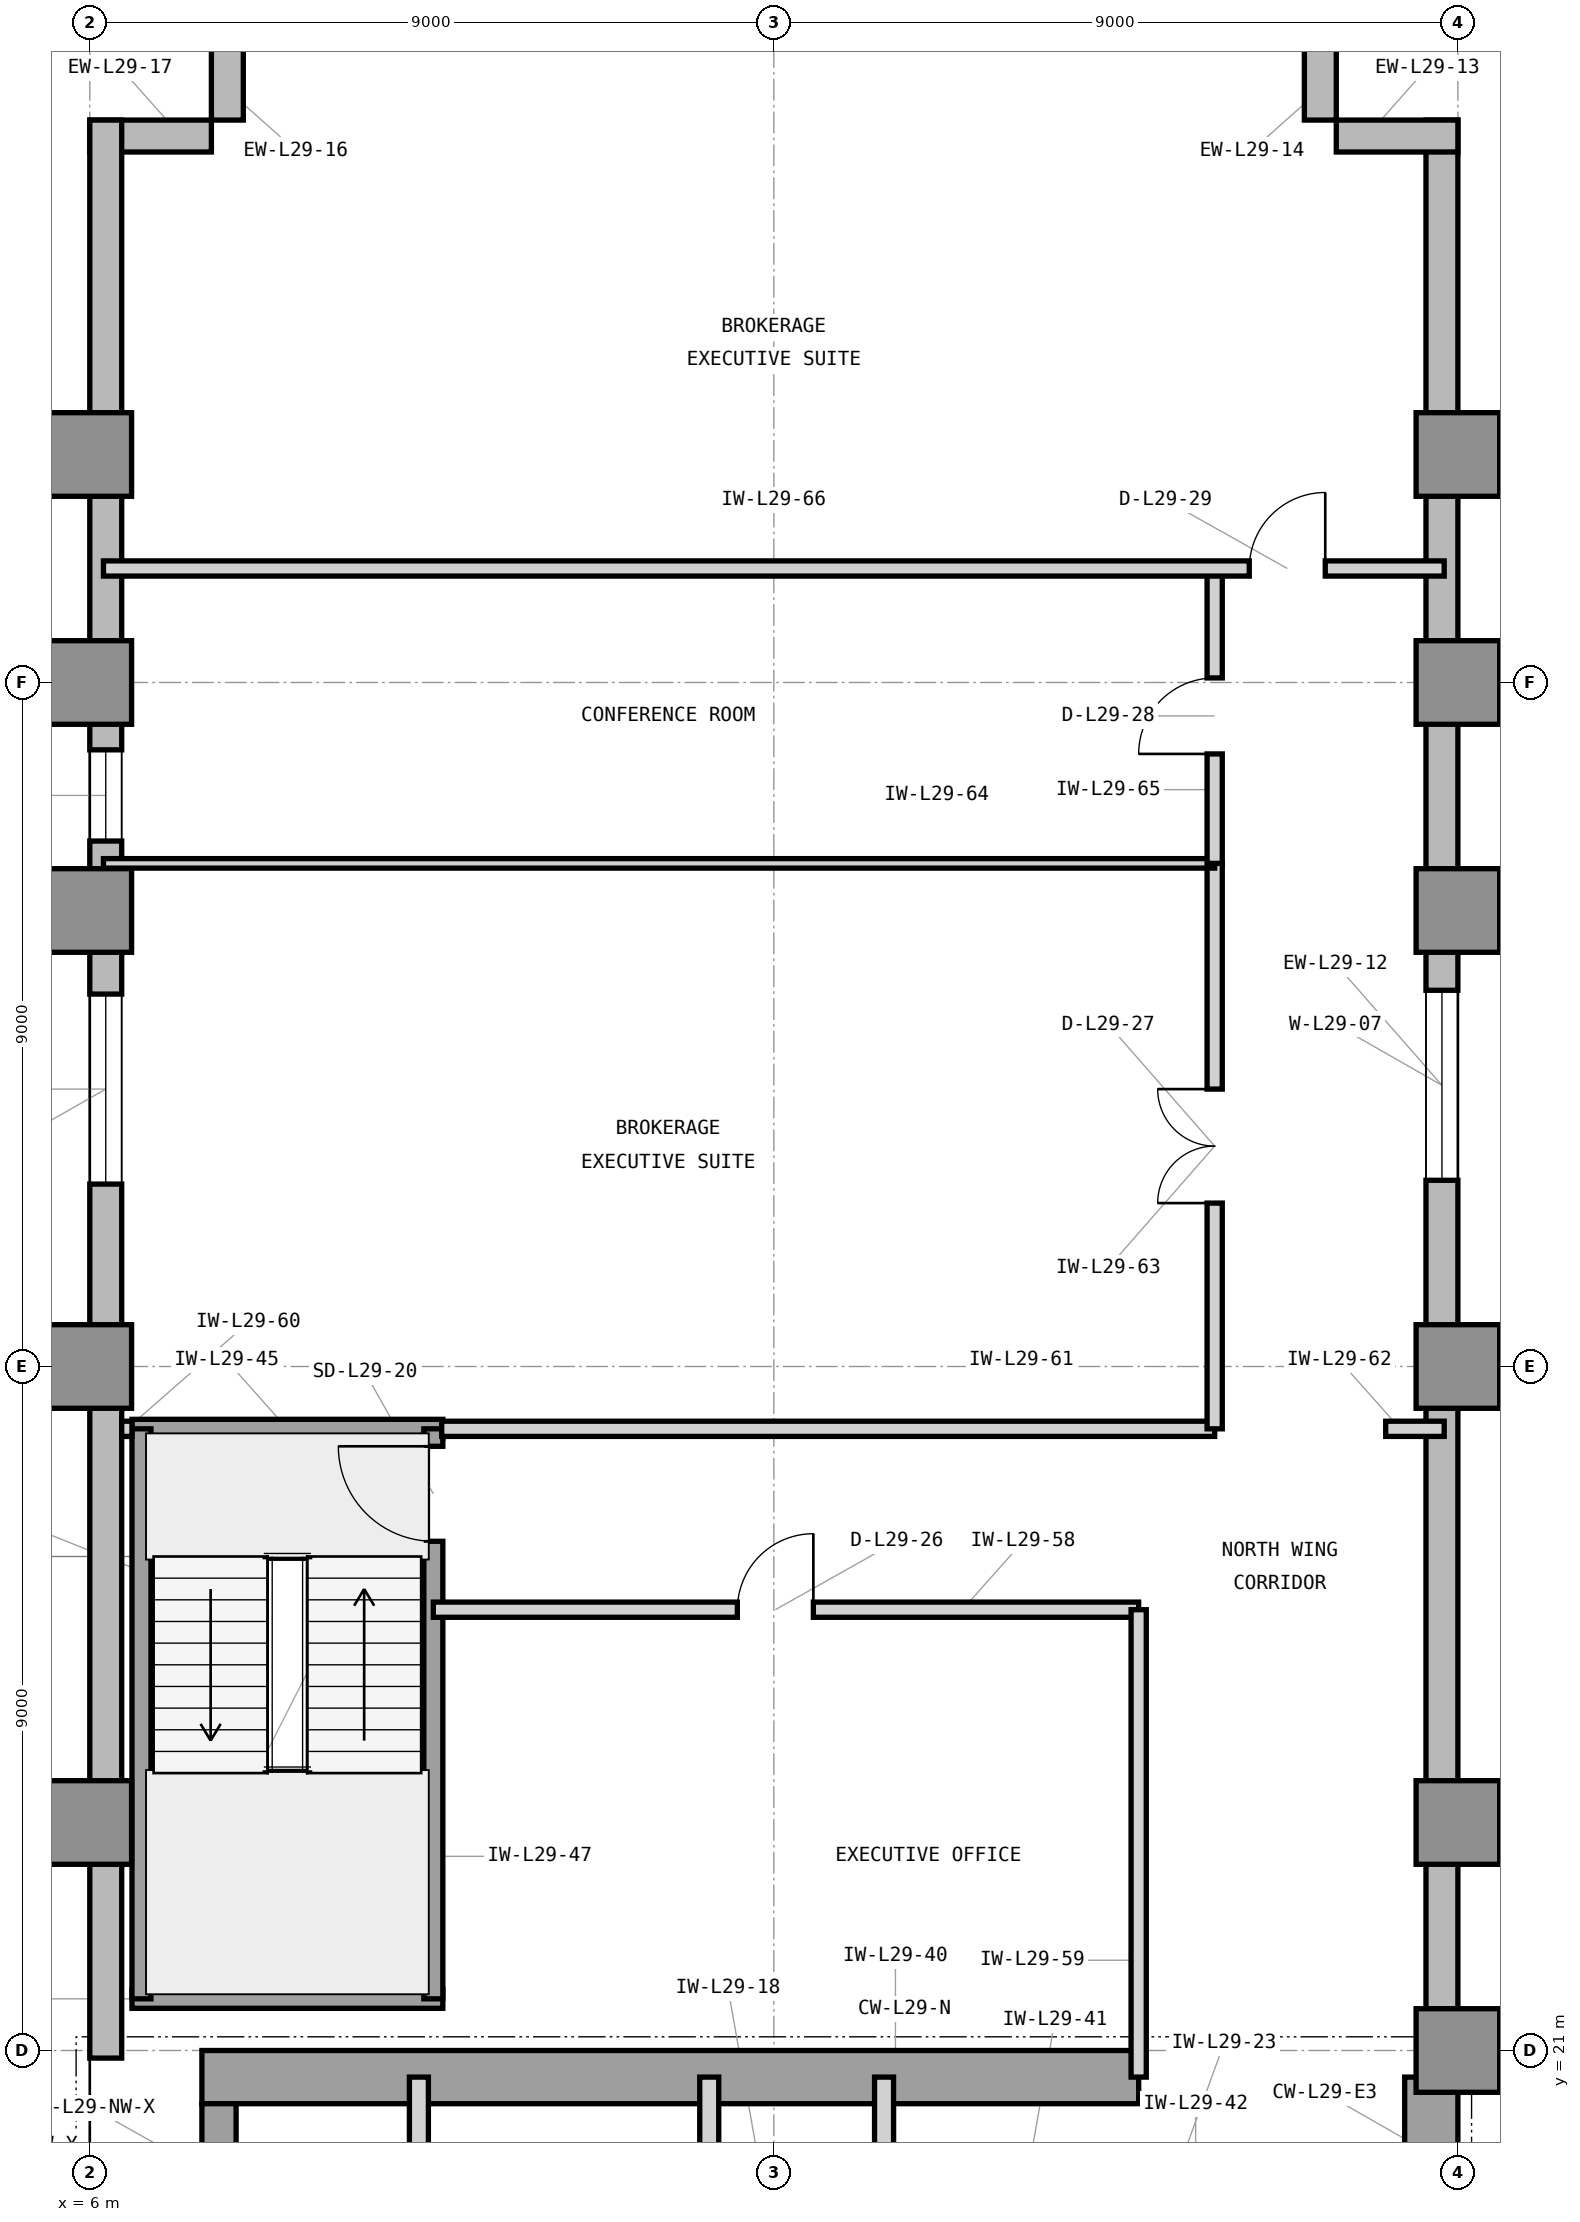
"""IFC4 building model, lengths in metres.
Left out: names, types, materials, properties, quantities, classifications, styles, units other than length and angle.
Written with IfcOpenShell. Run it as: python <this file> out.ifc"""

import sys

from ifc_helpers import new_model, si_unit, direction, frame, frame_2d, origin, origin_2d, place, context, subcontext, project, spatial, rectangle, extrude, element, fill, save


model = new_model("IFC4")
c1 = context("Model", 3, precision=1e-05, world=origin(), true_north=direction((0.0, 1.0)))
c2 = subcontext(c1, "Body", "Model", "MODEL_VIEW")
j1 = project(units=[si_unit("LENGTHUNIT", "METRE"), si_unit("PLANEANGLEUNIT", "RADIAN")], contexts=[c1])
p1 = place(None, origin())
s1 = spatial("IfcSite", under=j1, at=p1, CompositionType="ELEMENT")
p2 = place(p1, origin())
s2 = spatial("IfcBuilding", under=s1, at=p2, CompositionType="ELEMENT")
p3 = place(p2, frame((0.0, 0.0, 124.5)))
s3 = spatial("IfcBuildingStorey", under=s2, at=p3, CompositionType="ELEMENT", Elevation=124.5)
p4 = place(p3, frame((7.475, 20.65, 0.0), z_axis=(0.0, 0.0, 1.0), x_axis=(1.0, 0.0, 0.0)))
e1 = element("IfcWall", 1, at=p4, inside=s3, PredefinedType="SHEAR", context=c2, shape_type="SweptSolid", body=[
    extrude(rectangle(XDim=12.325, YDim=0.7, at=frame_2d((6.163, 0.0))), origin(), (0.0, 0.0, 1.0), 3.9),
])
p5 = place(p3, frame((23.65, 16.6, 0.0), z_axis=(0.0, 0.0, 1.0), x_axis=(0.0, 1.0, 0.0)))
e2 = element("IfcWall", 2, at=p5, inside=s3, PredefinedType="SHEAR", context=c2, shape_type="SweptSolid", body=[
    extrude(rectangle(XDim=4.05, YDim=0.7, at=frame_2d((2.025, 0.0))), origin(), (0.0, 0.0, 1.0), 3.9),
])
p6 = place(p3, frame((7.7, 19.575, 0.0), z_axis=(0.0, 0.0, 1.0), x_axis=(0.0, 1.0, 0.0)))
e3 = element("IfcWall", 3, at=p6, inside=s3, PredefinedType="SHEAR", context=c2, shape_type="SweptSolid", body=[
    extrude(rectangle(XDim=0.725, YDim=0.45, at=frame_2d((0.363, 0.0))), origin(), (0.0, 0.0, 1.0), 3.9),
])
for number, where, z_axis, x_axis in (
    (4, (24.0, 21.0, 0.0), (0.0, 0.0, 1.0), (1.0, 0.0, 0.0)),
    (5, (6.0, 24.0, 0.0), (0.0, 0.0, 1.0), (1.0, 0.0, 0.0)),
    (6, (24.0, 24.0, 0.0), (0.0, 0.0, 1.0), (1.0, 0.0, 0.0)),
    (7, (6.0, 30.0, 0.0), (0.0, 0.0, 1.0), (1.0, 0.0, 0.0)),
    (8, (24.0, 30.0, 0.0), (0.0, 0.0, 1.0), (1.0, 0.0, 0.0)),
    (9, (6.0, 36.0, 0.0), (0.0, 0.0, 1.0), (1.0, 0.0, 0.0)),
    (10, (24.0, 36.0, 0.0), (0.0, 0.0, 1.0), (1.0, 0.0, 0.0)),
    (11, (6.0, 39.0, 0.0), (0.0, 0.0, 1.0), (1.0, 0.0, 0.0)),
    (12, (24.0, 39.0, 0.0), (0.0, 0.0, 1.0), (1.0, 0.0, 0.0)),
    (13, (6.0, 42.0, 0.0), (0.0, 0.0, 1.0), (1.0, 0.0, 0.0)),
    (14, (24.0, 42.0, 0.0), (0.0, 0.0, 1.0), (1.0, 0.0, 0.0)),
):
    element("IfcColumn", number, at=place(p3, frame(where, z_axis=z_axis, x_axis=x_axis)), inside=s3, PredefinedType="COLUMN", context=c2, shape_type="SweptSolid", body=[
        extrude(rectangle(XDim=1.1, YDim=1.1, at=origin_2d()), origin(), (0.0, 0.0, 1.0), 3.9),
    ])
p7 = place(p3, frame((61.4, 20.79, 0.0), z_axis=(0.0, 0.0, 1.0), x_axis=(-1.0, 0.0, 0.0)))
e15 = element("IfcWall", 15, at=p7, inside=s3, PredefinedType="STANDARD", context=c2, shape_type="SweptSolid", body=[
    extrude(rectangle(XDim=37.4, YDim=0.42, at=frame_2d((18.7, 0.0))), origin(), (0.0, 0.0, 1.0), 3.7),
])
p8 = place(p7, frame((15.113, 0.0, 0.85)))
e16 = element("IfcOpeningElement", 16, at=p8, cuts=e15, PredefinedType="OPENING", context=c2, shape_type="SweptSolid", body=[
    extrude(rectangle(XDim=2.5, YDim=2.25, at=frame_2d((1.25, 1.125))), frame((0.0, 0.22, 0.0), z_axis=(0.0, -1.0, 0.0), x_axis=(1.0, 0.0, 0.0)), (0.0, 0.0, 1.0), 0.44),
])
p9 = place(p7, frame((24.462, 0.0, 0.85)))
e17 = element("IfcOpeningElement", 17, at=p9, cuts=e15, PredefinedType="OPENING", context=c2, shape_type="SweptSolid", body=[
    extrude(rectangle(XDim=2.5, YDim=2.25, at=frame_2d((1.25, 1.125))), frame((0.0, 0.22, 0.0), z_axis=(0.0, -1.0, 0.0), x_axis=(1.0, 0.0, 0.0)), (0.0, 0.0, 1.0), 0.44),
])
p10 = place(p3, frame((23.79, 21.0, 0.0), z_axis=(0.0, 0.0, 1.0), x_axis=(0.0, 1.0, 0.0)))
e18 = element("IfcWall", 18, at=p10, inside=s3, PredefinedType="STANDARD", context=c2, shape_type="SweptSolid", body=[
    extrude(rectangle(XDim=25.4, YDim=0.42, at=frame_2d((12.7, 0.0))), origin(), (0.0, 0.0, 1.0), 3.7),
])
p11 = place(p10, frame((11.45, 0.0, 0.85)))
e19 = element("IfcOpeningElement", 19, at=p11, cuts=e18, PredefinedType="OPENING", context=c2, shape_type="SweptSolid", body=[
    extrude(rectangle(XDim=2.5, YDim=2.25, at=frame_2d((1.25, 1.125))), frame((0.0, 0.22, 0.0), z_axis=(0.0, -1.0, 0.0), x_axis=(1.0, 0.0, 0.0)), (0.0, 0.0, 1.0), 0.44),
])
for number, where, z_axis, x_axis in (
    (20, (24.0, 46.19, 0.0), (0.0, 0.0, 1.0), (-1.0, 0.0, 0.0)),
    (21, (22.19, 46.4, 0.0), (0.0, 0.0, 1.0), (0.0, 1.0, 0.0)),
    (22, (7.81, 48.0, 0.0), (0.0, 0.0, 1.0), (0.0, -1.0, 0.0)),
    (23, (7.6, 46.19, 0.0), (0.0, 0.0, 1.0), (-1.0, 0.0, 0.0)),
):
    element("IfcWall", number, at=place(p3, frame(where, z_axis=z_axis, x_axis=x_axis)), inside=s3, PredefinedType="STANDARD", context=c2, shape_type="SweptSolid", body=[
        extrude(rectangle(XDim=1.6, YDim=0.42, at=frame_2d((0.8, 0.0))), origin(), (0.0, 0.0, 1.0), 3.7),
    ])
p12 = place(p3, frame((6.21, 46.4, 0.0), z_axis=(0.0, 0.0, 1.0), x_axis=(0.0, -1.0, 0.0)))
e24 = element("IfcWall", 24, at=p12, inside=s3, PredefinedType="STANDARD", context=c2, shape_type="SweptSolid", body=[
    extrude(rectangle(XDim=25.5, YDim=0.42, at=frame_2d((12.75, 0.0))), origin(), (0.0, 0.0, 1.0), 3.7),
])
p13 = place(p12, frame((11.5, 0.0, 0.85)))
e25 = element("IfcOpeningElement", 25, at=p13, cuts=e24, PredefinedType="OPENING", context=c2, shape_type="SweptSolid", body=[
    extrude(rectangle(XDim=2.5, YDim=2.25, at=frame_2d((1.25, 1.125))), frame((0.0, 0.22, 0.0), z_axis=(0.0, -1.0, 0.0), x_axis=(1.0, 0.0, 0.0)), (0.0, 0.0, 1.0), 0.44),
])
p14 = place(p12, frame((8.286, 0.0, 0.85)))
e26 = element("IfcOpeningElement", 26, at=p14, cuts=e24, PredefinedType="OPENING", context=c2, shape_type="SweptSolid", body=[
    extrude(rectangle(XDim=1.2, YDim=2.25, at=frame_2d((0.6, 1.125))), frame((0.0, 0.22, 0.0), z_axis=(0.0, -1.0, 0.0), x_axis=(1.0, 0.0, 0.0)), (0.0, 0.0, 1.0), 0.44),
])
p15 = place(p3, frame((10.33, 19.45, 0.0), z_axis=(0.0, 0.0, 1.0), x_axis=(0.0, 1.0, 0.0)))
e27 = element("IfcWall", 27, at=p15, inside=s3, PredefinedType="PARTITIONING", context=c2, shape_type="SweptSolid", body=[
    extrude(rectangle(XDim=1.2, YDim=0.25, at=frame_2d((0.6, 0.0))), origin(), (0.0, 0.0, 1.0), 2.994),
])
for number, where, z_axis, x_axis in (
    (28, (14.15, 16.7, 0.0), (0.0, 0.0, 1.0), (0.0, 1.0, 0.0)),
    (29, (16.45, 16.7, 0.0), (0.0, 0.0, 1.0), (0.0, 1.0, 0.0)),
):
    element("IfcWall", number, at=place(p3, frame(where, z_axis=z_axis, x_axis=x_axis)), inside=s3, PredefinedType="PARTITIONING", context=c2, shape_type="SweptSolid", body=[
        extrude(rectangle(XDim=3.95, YDim=0.25, at=frame_2d((1.975, 0.0))), origin(), (0.0, 0.0, 1.0), 3.69),
    ])
for number, where, z_axis, x_axis in (
    (30, (6.555, 21.68, 0.0), (0.0, 0.0, 1.0), (1.0, 0.0, 0.0)),
    (31, (6.555, 29.18, 0.0), (0.0, 0.0, 1.0), (1.0, 0.0, 0.0)),
):
    element("IfcWall", number, at=place(p3, frame(where, z_axis=z_axis, x_axis=x_axis)), inside=s3, PredefinedType="SHEAR", context=c2, shape_type="SweptSolid", body=[
        extrude(rectangle(XDim=4.09, YDim=0.25, at=frame_2d((2.045, 0.0))), origin(), (0.0, 0.0, 1.0), 3.9),
    ])
p16 = place(p3, frame((6.68, 21.68, 0.0), z_axis=(0.0, 0.0, 1.0), x_axis=(0.0, 1.0, 0.0)))
e32 = element("IfcWall", 32, at=p16, inside=s3, PredefinedType="SHEAR", context=c2, shape_type="SweptSolid", body=[
    extrude(rectangle(XDim=7.5, YDim=0.25, at=frame_2d((3.75, 0.0))), origin(), (0.0, 0.0, 1.0), 3.9),
])
p17 = place(p3, frame((10.52, 21.68, 0.0), z_axis=(0.0, 0.0, 1.0), x_axis=(0.0, 1.0, 0.0)))
e33 = element("IfcWall", 33, at=p17, inside=s3, PredefinedType="SHEAR", context=c2, shape_type="SweptSolid", body=[
    extrude(rectangle(XDim=7.5, YDim=0.25, at=frame_2d((3.75, 0.0))), origin(), (0.0, 0.0, 1.0), 3.9),
])
p18 = place(p17, frame((6.02, 0.0, 0.0)))
e34 = element("IfcOpeningElement", 34, at=p18, cuts=e33, PredefinedType="OPENING", context=c2, shape_type="SweptSolid", body=[
    extrude(rectangle(XDim=1.25, YDim=2.2, at=frame_2d((0.625, 1.1))), frame((0.0, 0.135, 0.0), z_axis=(0.0, -1.0, 0.0), x_axis=(1.0, 0.0, 0.0)), (0.0, 0.0, 1.0), 0.27),
])
p19 = place(p3, frame((10.52, 26.8, 0.0), z_axis=(0.0, 0.0, 1.0), x_axis=(1.0, 0.0, 0.0)))
e35 = element("IfcWall", 35, at=p19, inside=s3, PredefinedType="PARTITIONING", context=c2, shape_type="SweptSolid", body=[
    extrude(rectangle(XDim=9.28, YDim=0.2, at=frame_2d((4.64, 0.0))), origin(), (0.0, 0.0, 1.0), 3.69),
])
p20 = place(p19, frame((4.0, 0.0, 0.0)))
e36 = element("IfcOpeningElement", 36, at=p20, cuts=e35, PredefinedType="OPENING", context=c2, shape_type="SweptSolid", body=[
    extrude(rectangle(XDim=1.0, YDim=2.15, at=frame_2d((0.5, 1.075))), frame((0.0, 0.11, 0.0), z_axis=(0.0, -1.0, 0.0), x_axis=(1.0, 0.0, 0.0)), (0.0, 0.0, 1.0), 0.22),
])
p21 = place(p3, frame((19.8, 20.65, 0.0), z_axis=(0.0, 0.0, 1.0), x_axis=(0.0, 1.0, 0.0)))
e37 = element("IfcWall", 37, at=p21, inside=s3, PredefinedType="PARTITIONING", context=c2, shape_type="SweptSolid", body=[
    extrude(rectangle(XDim=6.15, YDim=0.2, at=frame_2d((3.075, 0.0))), origin(), (0.0, 0.0, 1.0), 3.69),
])
p22 = place(p3, frame((6.42, 29.18, 0.0), z_axis=(0.0, 0.0, 1.0), x_axis=(1.0, 0.0, 0.0)))
e38 = element("IfcWall", 38, at=p22, inside=s3, PredefinedType="PARTITIONING", context=c2, shape_type="SweptSolid", body=[
    extrude(rectangle(XDim=0.135, YDim=0.2, at=frame_2d((0.067, 0.0))), origin(), (0.0, 0.0, 1.0), 3.69),
])
p23 = place(p3, frame((10.63, 29.18, 0.0), z_axis=(0.0, 0.0, 1.0), x_axis=(1.0, 0.0, 0.0)))
e39 = element("IfcWall", 39, at=p23, inside=s3, PredefinedType="PARTITIONING", context=c2, shape_type="SweptSolid", body=[
    extrude(rectangle(XDim=10.17, YDim=0.2, at=frame_2d((5.085, 0.0))), origin(), (0.0, 0.0, 1.0), 3.69),
])
p24 = place(p3, frame((23.05, 29.18, 0.0), z_axis=(0.0, 0.0, 1.0), x_axis=(1.0, 0.0, 0.0)))
e40 = element("IfcWall", 40, at=p24, inside=s3, PredefinedType="PARTITIONING", context=c2, shape_type="SweptSolid", body=[
    extrude(rectangle(XDim=0.77, YDim=0.2, at=frame_2d((0.385, 0.0))), origin(), (0.0, 0.0, 1.0), 3.69),
])
p25 = place(p3, frame((20.8, 29.18, 0.0), z_axis=(0.0, 0.0, 1.0), x_axis=(0.0, 1.0, 0.0)))
e41 = element("IfcWall", 41, at=p25, inside=s3, PredefinedType="PARTITIONING", context=c2, shape_type="SweptSolid", body=[
    extrude(rectangle(XDim=7.44, YDim=0.2, at=frame_2d((3.72, 0.0))), origin(), (0.0, 0.0, 1.0), 3.69),
])
p26 = place(p25, frame((2.97, 0.0, 0.0)))
e42 = element("IfcOpeningElement", 42, at=p26, cuts=e41, PredefinedType="OPENING", context=c2, shape_type="SweptSolid", body=[
    extrude(rectangle(XDim=1.5, YDim=2.3, at=frame_2d((0.75, 1.15))), frame((0.0, 0.11, 0.0), z_axis=(0.0, -1.0, 0.0), x_axis=(1.0, 0.0, 0.0)), (0.0, 0.0, 1.0), 0.22),
])
p27 = place(p3, frame((6.18, 36.62, 0.0), z_axis=(0.0, 0.0, 1.0), x_axis=(1.0, 0.0, 0.0)))
e43 = element("IfcWall", 43, at=p27, inside=s3, PredefinedType="PARTITIONING", context=c2, shape_type="SweptSolid", body=[
    extrude(rectangle(XDim=14.62, YDim=0.125, at=frame_2d((7.31, 0.0))), origin(), (0.0, 0.0, 1.0), 3.69),
])
p28 = place(p3, frame((20.8, 36.62, 0.0), z_axis=(0.0, 0.0, 1.0), x_axis=(0.0, 1.0, 0.0)))
e44 = element("IfcWall", 44, at=p28, inside=s3, PredefinedType="PARTITIONING", context=c2, shape_type="SweptSolid", body=[
    extrude(rectangle(XDim=3.88, YDim=0.2, at=frame_2d((1.94, 0.0))), origin(), (0.0, 0.0, 1.0), 3.69),
])
p29 = place(p28, frame((1.44, 0.0, 0.0)))
e45 = element("IfcOpeningElement", 45, at=p29, cuts=e44, PredefinedType="OPENING", context=c2, shape_type="SweptSolid", body=[
    extrude(rectangle(XDim=1.0, YDim=2.15, at=frame_2d((0.5, 1.075))), frame((0.0, 0.11, 0.0), z_axis=(0.0, -1.0, 0.0), x_axis=(1.0, 0.0, 0.0)), (0.0, 0.0, 1.0), 0.22),
])
p30 = place(p3, frame((6.18, 40.5, 0.0), z_axis=(0.0, 0.0, 1.0), x_axis=(1.0, 0.0, 0.0)))
e46 = element("IfcWall", 46, at=p30, inside=s3, PredefinedType="PARTITIONING", context=c2, shape_type="SweptSolid", body=[
    extrude(rectangle(XDim=17.64, YDim=0.2, at=frame_2d((8.82, 0.0))), origin(), (0.0, 0.0, 1.0), 3.69),
])
p31 = place(p30, frame((15.075, 0.0, 0.0)))
e47 = element("IfcOpeningElement", 47, at=p31, cuts=e46, PredefinedType="OPENING", context=c2, shape_type="SweptSolid", body=[
    extrude(rectangle(XDim=1.0, YDim=2.15, at=frame_2d((0.5, 1.075))), frame((0.0, 0.11, 0.0), z_axis=(0.0, -1.0, 0.0), x_axis=(1.0, 0.0, 0.0)), (0.0, 0.0, 1.0), 0.22),
])
p32 = place(p11, origin())
e48 = element("IfcWindow", 48, at=p32, inside=s3, PartitioningType="SINGLE_PANEL", PredefinedType="WINDOW", context=c2, shape_type="SweptSolid", body=[
    extrude(rectangle(XDim=2.5, YDim=2.25, at=frame_2d((1.25, 1.125))), frame((0.0, 0.11, 0.0), z_axis=(0.0, -1.0, 0.0), x_axis=(1.0, 0.0, 0.0)), (0.0, 0.0, 1.0), 0.06),
])
fill(e19, e48)
p33 = place(p13, origin())
e49 = element("IfcWindow", 49, at=p33, inside=s3, PartitioningType="SINGLE_PANEL", PredefinedType="WINDOW", context=c2, shape_type="SweptSolid", body=[
    extrude(rectangle(XDim=2.5, YDim=2.25, at=frame_2d((1.25, 1.125))), frame((0.0, 0.11, 0.0), z_axis=(0.0, -1.0, 0.0), x_axis=(1.0, 0.0, 0.0)), (0.0, 0.0, 1.0), 0.06),
])
fill(e25, e49)
p34 = place(p18, origin())
e50 = element("IfcDoor", 50, at=p34, inside=s3, OperationType="SINGLE_SWING_RIGHT", PredefinedType="DOOR", context=c2, shape_type="SweptSolid", body=[
    extrude(rectangle(XDim=1.25, YDim=2.2, at=frame_2d((0.625, 1.1))), frame((0.0, 0.025, 0.0), z_axis=(0.0, -1.0, 0.0), x_axis=(1.0, 0.0, 0.0)), (0.0, 0.0, 1.0), 0.05),
])
fill(e34, e50)
p35 = place(p20, origin())
e51 = element("IfcDoor", 51, at=p35, inside=s3, OperationType="SINGLE_SWING_RIGHT", PredefinedType="DOOR", context=c2, shape_type="SweptSolid", body=[
    extrude(rectangle(XDim=1.0, YDim=2.15, at=frame_2d((0.5, 1.075))), frame((0.0, 0.025, 0.0), z_axis=(0.0, -1.0, 0.0), x_axis=(1.0, 0.0, 0.0)), (0.0, 0.0, 1.0), 0.05),
])
fill(e36, e51)
p36 = place(p26, origin())
e52 = element("IfcDoor", 52, at=p36, inside=s3, OperationType="DOUBLE_DOOR_SINGLE_SWING", PredefinedType="DOOR", context=c2, shape_type="SweptSolid", body=[
    extrude(rectangle(XDim=1.5, YDim=2.3, at=frame_2d((0.75, 1.15))), frame((0.0, 0.025, 0.0), z_axis=(0.0, -1.0, 0.0), x_axis=(1.0, 0.0, 0.0)), (0.0, 0.0, 1.0), 0.05),
])
fill(e42, e52)
p37 = place(p29, origin())
e53 = element("IfcDoor", 53, at=p37, inside=s3, OperationType="SINGLE_SWING_LEFT", PredefinedType="DOOR", context=c2, shape_type="SweptSolid", body=[
    extrude(rectangle(XDim=1.0, YDim=2.15, at=frame_2d((0.5, 1.075))), frame((0.0, 0.025, 0.0), z_axis=(0.0, -1.0, 0.0), x_axis=(1.0, 0.0, 0.0)), (0.0, 0.0, 1.0), 0.05),
])
fill(e45, e53)
p38 = place(p31, origin())
e54 = element("IfcDoor", 54, at=p38, inside=s3, OperationType="SINGLE_SWING_RIGHT", PredefinedType="DOOR", context=c2, shape_type="SweptSolid", body=[
    extrude(rectangle(XDim=1.0, YDim=2.15, at=frame_2d((0.5, 1.075))), frame((0.0, 0.025, 0.0), z_axis=(0.0, -1.0, 0.0), x_axis=(1.0, 0.0, 0.0)), (0.0, 0.0, 1.0), 0.05),
])
fill(e47, e54)
p39 = place(p14, origin())
e55 = element("IfcWindow", 55, at=p39, inside=s3, PartitioningType="SINGLE_PANEL", PredefinedType="WINDOW", context=c2, shape_type="SweptSolid", body=[
    extrude(rectangle(XDim=1.2, YDim=2.25, at=frame_2d((0.6, 1.125))), frame((0.0, 0.11, 0.0), z_axis=(0.0, -1.0, 0.0), x_axis=(1.0, 0.0, 0.0)), (0.0, 0.0, 1.0), 0.06),
])
fill(e26, e55)
save(model, sys.argv[1])
